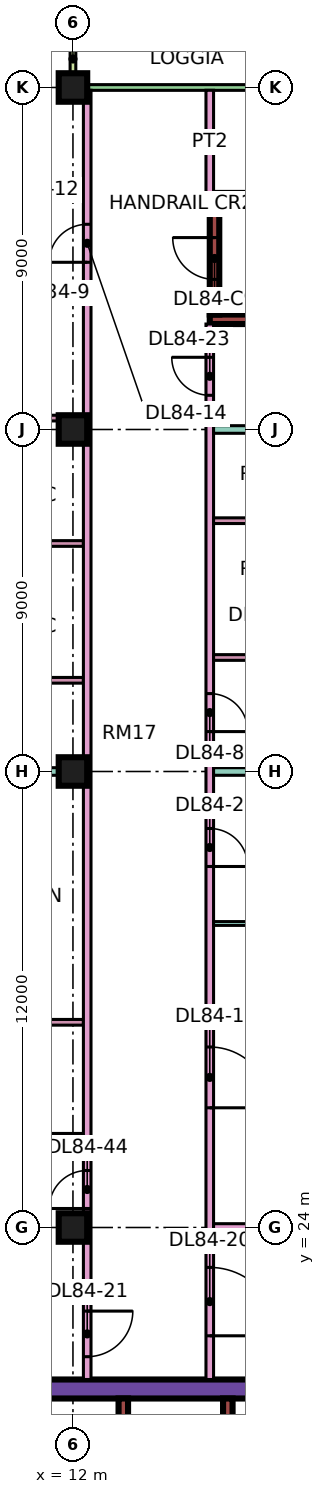
"""IFC4 building model, lengths in metres.
Left out: names, types, materials, properties, quantities, classifications, styles, units other than length and angle.
Written with IfcOpenShell. Run it as: python <this file> out.ifc"""

import sys

from ifc_helpers import new_model, si_unit, direction, frame, frame_2d, origin, origin_2d, place, context, subcontext, project, spatial, rectangle, extrude, element, fill, save


model = new_model("IFC4")
c1 = context("Model", 3, precision=1e-05, world=origin(), true_north=direction((0.0, 1.0)))
c2 = subcontext(c1, "Body", "Model", "MODEL_VIEW")
j1 = project(units=[si_unit("LENGTHUNIT", "METRE"), si_unit("PLANEANGLEUNIT", "RADIAN")], contexts=[c1])
p1 = place(None, origin())
s1 = spatial("IfcSite", under=j1, at=p1, CompositionType="ELEMENT")
p2 = place(p1, origin())
s2 = spatial("IfcBuilding", under=s1, at=p2, CompositionType="ELEMENT")
p3 = place(p2, frame((0.0, 0.0, 361.4)))
s3 = spatial("IfcBuildingStorey", under=s2, at=p3, CompositionType="ELEMENT", Elevation=361.4)
for number, where, z_axis, x_axis in (
    (1, (12.0, 24.0, 0.0), (0.0, 0.0, 1.0), (1.0, 0.0, 0.0)),
    (2, (12.0, 36.0, 0.0), (0.0, 0.0, 1.0), (1.0, 0.0, 0.0)),
    (3, (12.0, 45.0, 0.0), (0.0, 0.0, 1.0), (1.0, 0.0, 0.0)),
    (4, (12.0, 54.0, 0.0), (0.0, 0.0, 1.0), (1.0, 0.0, 0.0)),
):
    element("IfcColumn", number, at=place(p3, frame(where, z_axis=z_axis, x_axis=x_axis)), inside=s3, PredefinedType="COLUMN", context=c2, shape_type="SweptSolid", body=[
        extrude(rectangle(XDim=0.75, YDim=0.75, at=origin_2d()), origin(), (0.0, 0.0, 1.0), 3.75),
    ])
p4 = place(p3, frame((9.0, 19.75, 0.0), z_axis=(0.0, 0.0, 1.0), x_axis=(1.0, 0.0, 0.0)))
e5 = element("IfcWall", 5, at=p4, inside=s3, PredefinedType="SHEAR", context=c2, shape_type="SweptSolid", body=[
    extrude(rectangle(XDim=25.0, YDim=0.5, at=frame_2d((12.5, 0.0))), origin(), (0.0, 0.0, 1.0), 3.75),
])
p5 = place(p4, frame((19.1, 0.0, 0.0)))
e6 = element("IfcOpeningElement", 6, at=p5, cuts=e5, PredefinedType="OPENING", context=c2, shape_type="SweptSolid", body=[
    extrude(rectangle(XDim=1.8, YDim=2.4, at=frame_2d((0.9, 1.2))), frame((0.0, 0.26, 0.0), z_axis=(0.0, -1.0, 0.0), x_axis=(1.0, 0.0, 0.0)), (0.0, 0.0, 1.0), 0.52),
])
p6 = place(p3, frame((13.325, 7.5, 0.0), z_axis=(0.0, 0.0, 1.0), x_axis=(0.0, 1.0, 0.0)))
e7 = element("IfcWall", 7, at=p6, inside=s3, PredefinedType="SHEAR", context=c2, shape_type="SweptSolid", body=[
    extrude(rectangle(XDim=12.0, YDim=0.25, at=frame_2d((6.0, 0.0))), origin(), (0.0, 0.0, 1.0), 3.75),
])
p7 = place(p3, frame((16.075, 15.8, 0.0), z_axis=(0.0, 0.0, 1.0), x_axis=(0.0, 1.0, 0.0)))
e8 = element("IfcWall", 8, at=p7, inside=s3, PredefinedType="SHEAR", context=c2, shape_type="SweptSolid", body=[
    extrude(rectangle(XDim=3.7, YDim=0.25, at=frame_2d((1.85, 0.0))), origin(), (0.0, 0.0, 1.0), 3.75),
])
for number, where, z_axis, x_axis in (
    (9, (15.6, 47.9, 0.0), (0.0, 0.0, 1.0), (1.0, 0.0, 0.0)),
    (10, (15.6, 51.1, 0.0), (0.0, 0.0, 1.0), (1.0, 0.0, 0.0)),
):
    element("IfcWall", number, at=place(p3, frame(where, z_axis=z_axis, x_axis=x_axis)), inside=s3, PredefinedType="SHEAR", context=c2, shape_type="SweptSolid", body=[
        extrude(rectangle(XDim=7.0, YDim=0.25, at=frame_2d((3.5, 0.0))), origin(), (0.0, 0.0, 1.0), 3.75),
    ])
p8 = place(p3, frame((15.725, 48.025, 0.0), z_axis=(0.0, 0.0, 1.0), x_axis=(0.0, 1.0, 0.0)))
e11 = element("IfcWall", 11, at=p8, inside=s3, PredefinedType="SHEAR", context=c2, shape_type="SweptSolid", body=[
    extrude(rectangle(XDim=2.95, YDim=0.25, at=frame_2d((1.475, 0.0))), origin(), (0.0, 0.0, 1.0), 3.75),
])
p9 = place(p8, frame((0.925, 0.0, 0.0)))
e12 = element("IfcOpeningElement", 12, at=p9, cuts=e11, PredefinedType="OPENING", context=c2, shape_type="SweptSolid", body=[
    extrude(rectangle(XDim=1.1, YDim=2.2, at=frame_2d((0.55, 1.1))), frame((0.0, 0.135, 0.0), z_axis=(0.0, -1.0, 0.0), x_axis=(1.0, 0.0, 0.0)), (0.0, 0.0, 1.0), 0.27),
])
p10 = place(p3, frame((22.425, 54.0, 0.0), z_axis=(0.0, 0.0, 1.0), x_axis=(-1.0, 0.0, 0.0)))
e13 = element("IfcWall", 13, at=p10, inside=s3, PredefinedType="SOLIDWALL", context=c2, shape_type="SweptSolid", body=[
    extrude(rectangle(XDim=10.35, YDim=0.15, at=frame_2d((5.175, 0.0))), origin(), (0.0, 0.0, 1.0), 3.35),
])
p11 = place(p10, frame((1.012, 0.0, 0.45)))
e14 = element("IfcOpeningElement", 14, at=p11, cuts=e13, PredefinedType="OPENING", context=c2, shape_type="SweptSolid", body=[
    extrude(rectangle(XDim=4.8, YDim=2.4, at=frame_2d((2.4, 1.2))), frame((0.0, 0.085, 0.0), z_axis=(0.0, -1.0, 0.0), x_axis=(1.0, 0.0, 0.0)), (0.0, 0.0, 1.0), 0.17),
])
p12 = place(p3, frame((12.0, 55.5, 0.0), z_axis=(0.0, 0.0, 1.0), x_axis=(0.0, -1.0, 0.0)))
e15 = element("IfcWall", 15, at=p12, inside=s3, PredefinedType="SOLIDWALL", context=c2, shape_type="SweptSolid", body=[
    extrude(rectangle(XDim=1.5, YDim=0.15, at=frame_2d((0.75, 0.0))), origin(), (0.0, 0.0, 1.0), 3.35),
])
p13 = place(p3, frame((0.0, 36.0, 0.0), z_axis=(0.0, 0.0, 1.0), x_axis=(1.0, 0.0, 0.0)))
e16 = element("IfcWall", 16, at=p13, inside=s3, PredefinedType="PARTITIONING", context=c2, shape_type="SweptSolid", body=[
    extrude(rectangle(XDim=12.275, YDim=0.2, at=frame_2d((6.137, 0.0))), origin(), (0.0, 0.0, 1.0), 3.35),
])
p14 = place(p3, frame((0.074, 22.4, 0.0), z_axis=(0.0, 0.0, 1.0), x_axis=(1.0, 0.0, 0.0)))
e17 = element("IfcWall", 17, at=p14, inside=s3, PredefinedType="PARTITIONING", context=c2, shape_type="SweptSolid", body=[
    extrude(rectangle(XDim=12.201, YDim=0.2, at=frame_2d((6.101, 0.0))), origin(), (0.0, 0.0, 1.0), 3.35),
])
for number, where, z_axis, x_axis in (
    (18, (7.05, 26.4, 0.0), (0.0, 0.0, 1.0), (1.0, 0.0, 0.0)),
    (19, (7.05, 29.4, 0.0), (0.0, 0.0, 1.0), (1.0, 0.0, 0.0)),
):
    element("IfcWall", number, at=place(p3, frame(where, z_axis=z_axis, x_axis=x_axis)), inside=s3, PredefinedType="PARTITIONING", context=c2, shape_type="SweptSolid", body=[
        extrude(rectangle(XDim=5.225, YDim=0.15, at=frame_2d((2.612, 0.0))), origin(), (0.0, 0.0, 1.0), 3.35),
    ])
p15 = place(p3, frame((7.525, 51.3, 0.0), z_axis=(0.0, 0.0, 1.0), x_axis=(1.0, 0.0, 0.0)))
e20 = element("IfcWall", 20, at=p15, inside=s3, PredefinedType="PARTITIONING", context=c2, shape_type="SweptSolid", body=[
    extrude(rectangle(XDim=4.75, YDim=0.1, at=frame_2d((2.375, 0.0))), origin(), (0.0, 0.0, 1.0), 3.35),
])
p16 = place(p15, frame((2.0, 0.0, 0.0)))
e21 = element("IfcOpeningElement", 21, at=p16, cuts=e20, PredefinedType="OPENING", context=c2, shape_type="SweptSolid", body=[
    extrude(rectangle(XDim=0.9, YDim=2.1, at=frame_2d((0.45, 1.05))), frame((0.0, 0.06, 0.0), z_axis=(0.0, -1.0, 0.0), x_axis=(1.0, 0.0, 0.0)), (0.0, 0.0, 1.0), 0.12),
])
for number, where, z_axis, x_axis in (
    (22, (7.65, 38.4, 0.0), (0.0, 0.0, 1.0), (1.0, 0.0, 0.0)),
    (23, (7.65, 42.0, 0.0), (0.0, 0.0, 1.0), (1.0, 0.0, 0.0)),
    (24, (7.65, 45.3, 0.0), (0.0, 0.0, 1.0), (1.0, 0.0, 0.0)),
):
    element("IfcWall", number, at=place(p3, frame(where, z_axis=z_axis, x_axis=x_axis)), inside=s3, PredefinedType="PARTITIONING", context=c2, shape_type="SweptSolid", body=[
        extrude(rectangle(XDim=4.625, YDim=0.15, at=frame_2d((2.312, 0.0))), origin(), (0.0, 0.0, 1.0), 3.35),
    ])
p17 = place(p3, frame((7.65, 48.6, 0.0), z_axis=(0.0, 0.0, 1.0), x_axis=(1.0, 0.0, 0.0)))
e25 = element("IfcWall", 25, at=p17, inside=s3, PredefinedType="PARTITIONING", context=c2, shape_type="SweptSolid", body=[
    extrude(rectangle(XDim=4.625, YDim=0.15, at=frame_2d((2.312, 0.0))), origin(), (0.0, 0.0, 1.0), 3.35),
])
p18 = place(p17, frame((1.875, 0.0, 0.0)))
e26 = element("IfcOpeningElement", 26, at=p18, cuts=e25, PredefinedType="OPENING", context=c2, shape_type="SweptSolid", body=[
    extrude(rectangle(XDim=0.8, YDim=2.1, at=frame_2d((0.4, 1.05))), frame((0.0, 0.085, 0.0), z_axis=(0.0, -1.0, 0.0), x_axis=(1.0, 0.0, 0.0)), (0.0, 0.0, 1.0), 0.17),
])
p19 = place(p3, frame((12.375, 20.0, 0.0), z_axis=(0.0, 0.0, 1.0), x_axis=(0.0, 1.0, 0.0)))
e27 = element("IfcWall", 27, at=p19, inside=s3, PredefinedType="PARTITIONING", context=c2, shape_type="SweptSolid", body=[
    extrude(rectangle(XDim=33.926, YDim=0.2, at=frame_2d((16.963, 0.0))), origin(), (0.0, 0.0, 1.0), 3.35),
])
p20 = place(p19, frame((29.4, 0.0, 0.0)))
e28 = element("IfcOpeningElement", 28, at=p20, cuts=e27, PredefinedType="OPENING", context=c2, shape_type="SweptSolid", body=[
    extrude(rectangle(XDim=1.0, YDim=2.1, at=frame_2d((0.5, 1.05))), frame((0.0, 0.11, 0.0), z_axis=(0.0, -1.0, 0.0), x_axis=(1.0, 0.0, 0.0)), (0.0, 0.0, 1.0), 0.22),
])
p21 = place(p19, frame((0.6, 0.0, 0.0)))
e29 = element("IfcOpeningElement", 29, at=p21, cuts=e27, PredefinedType="OPENING", context=c2, shape_type="SweptSolid", body=[
    extrude(rectangle(XDim=1.2, YDim=2.1, at=frame_2d((0.6, 1.05))), frame((0.0, 0.11, 0.0), z_axis=(0.0, -1.0, 0.0), x_axis=(1.0, 0.0, 0.0)), (0.0, 0.0, 1.0), 0.22),
])
p22 = place(p19, frame((4.5, 0.0, 0.0)))
e30 = element("IfcOpeningElement", 30, at=p22, cuts=e27, PredefinedType="OPENING", context=c2, shape_type="SweptSolid", body=[
    extrude(rectangle(XDim=1.0, YDim=2.1, at=frame_2d((0.5, 1.05))), frame((0.0, 0.11, 0.0), z_axis=(0.0, -1.0, 0.0), x_axis=(1.0, 0.0, 0.0)), (0.0, 0.0, 1.0), 0.22),
])
p23 = place(p3, frame((15.6, 20.0, 0.0), z_axis=(0.0, 0.0, 1.0), x_axis=(0.0, 1.0, 0.0)))
e31 = element("IfcWall", 31, at=p23, inside=s3, PredefinedType="PARTITIONING", context=c2, shape_type="SweptSolid", body=[
    extrude(rectangle(XDim=27.775, YDim=0.2, at=frame_2d((13.887, 0.0))), origin(), (0.0, 0.0, 1.0), 3.35),
])
p24 = place(p23, frame((7.15, 0.0, 0.0)))
e32 = element("IfcOpeningElement", 32, at=p24, cuts=e31, PredefinedType="OPENING", context=c2, shape_type="SweptSolid", body=[
    extrude(rectangle(XDim=1.6, YDim=2.1, at=frame_2d((0.8, 1.05))), frame((0.0, 0.11, 0.0), z_axis=(0.0, -1.0, 0.0), x_axis=(1.0, 0.0, 0.0)), (0.0, 0.0, 1.0), 0.22),
])
p25 = place(p23, frame((13.5, 0.0, 0.0)))
e33 = element("IfcOpeningElement", 33, at=p25, cuts=e31, PredefinedType="OPENING", context=c2, shape_type="SweptSolid", body=[
    extrude(rectangle(XDim=1.0, YDim=2.1, at=frame_2d((0.5, 1.05))), frame((0.0, 0.11, 0.0), z_axis=(0.0, -1.0, 0.0), x_axis=(1.0, 0.0, 0.0)), (0.0, 0.0, 1.0), 0.22),
])
p26 = place(p23, frame((17.05, 0.0, 0.0)))
e34 = element("IfcOpeningElement", 34, at=p26, cuts=e31, PredefinedType="OPENING", context=c2, shape_type="SweptSolid", body=[
    extrude(rectangle(XDim=1.0, YDim=2.1, at=frame_2d((0.5, 1.05))), frame((0.0, 0.11, 0.0), z_axis=(0.0, -1.0, 0.0), x_axis=(1.0, 0.0, 0.0)), (0.0, 0.0, 1.0), 0.22),
])
p27 = place(p23, frame((1.15, 0.0, 0.0)))
e35 = element("IfcOpeningElement", 35, at=p27, cuts=e31, PredefinedType="OPENING", context=c2, shape_type="SweptSolid", body=[
    extrude(rectangle(XDim=1.8, YDim=2.1, at=frame_2d((0.9, 1.05))), frame((0.0, 0.11, 0.0), z_axis=(0.0, -1.0, 0.0), x_axis=(1.0, 0.0, 0.0)), (0.0, 0.0, 1.0), 0.22),
])
p28 = place(p23, frame((25.9, 0.0, 0.0)))
e36 = element("IfcOpeningElement", 36, at=p28, cuts=e31, PredefinedType="OPENING", context=c2, shape_type="SweptSolid", body=[
    extrude(rectangle(XDim=1.0, YDim=2.1, at=frame_2d((0.5, 1.05))), frame((0.0, 0.11, 0.0), z_axis=(0.0, -1.0, 0.0), x_axis=(1.0, 0.0, 0.0)), (0.0, 0.0, 1.0), 0.22),
])
p29 = place(p3, frame((15.6, 51.225, 0.0), z_axis=(0.0, 0.0, 1.0), x_axis=(0.0, 1.0, 0.0)))
e37 = element("IfcWall", 37, at=p29, inside=s3, PredefinedType="PARTITIONING", context=c2, shape_type="SweptSolid", body=[
    extrude(rectangle(XDim=2.701, YDim=0.2, at=frame_2d((1.351, 0.0))), origin(), (0.0, 0.0, 1.0), 3.35),
])
p30 = place(p3, frame((15.7, 24.0, 0.0), z_axis=(0.0, 0.0, 1.0), x_axis=(1.0, 0.0, 0.0)))
e38 = element("IfcWall", 38, at=p30, inside=s3, PredefinedType="PARTITIONING", context=c2, shape_type="SweptSolid", body=[
    extrude(rectangle(XDim=5.8, YDim=0.2, at=frame_2d((2.9, 0.0))), origin(), (0.0, 0.0, 1.0), 3.35),
])
p31 = place(p3, frame((15.7, 32.0, 0.0), z_axis=(0.0, 0.0, 1.0), x_axis=(1.0, 0.0, 0.0)))
e39 = element("IfcWall", 39, at=p31, inside=s3, PredefinedType="PARTITIONING", context=c2, shape_type="SweptSolid", body=[
    extrude(rectangle(XDim=5.8, YDim=0.1, at=frame_2d((2.9, 0.0))), origin(), (0.0, 0.0, 1.0), 3.35),
])
p32 = place(p3, frame((15.7, 36.0, 0.0), z_axis=(0.0, 0.0, 1.0), x_axis=(1.0, 0.0, 0.0)))
e40 = element("IfcWall", 40, at=p32, inside=s3, PredefinedType="PARTITIONING", context=c2, shape_type="SweptSolid", body=[
    extrude(rectangle(XDim=8.3, YDim=0.2, at=frame_2d((4.15, 0.0))), origin(), (0.0, 0.0, 1.0), 3.35),
])
p33 = place(p3, frame((15.7, 39.0, 0.0), z_axis=(0.0, 0.0, 1.0), x_axis=(1.0, 0.0, 0.0)))
e41 = element("IfcWall", 41, at=p33, inside=s3, PredefinedType="PARTITIONING", context=c2, shape_type="SweptSolid", body=[
    extrude(rectangle(XDim=2.525, YDim=0.15, at=frame_2d((1.263, 0.0))), origin(), (0.0, 0.0, 1.0), 3.35),
])
p34 = place(p33, frame((0.9, 0.0, 0.0)))
e42 = element("IfcOpeningElement", 42, at=p34, cuts=e41, PredefinedType="OPENING", context=c2, shape_type="SweptSolid", body=[
    extrude(rectangle(XDim=0.8, YDim=2.1, at=frame_2d((0.4, 1.05))), frame((0.0, 0.085, 0.0), z_axis=(0.0, -1.0, 0.0), x_axis=(1.0, 0.0, 0.0)), (0.0, 0.0, 1.0), 0.17),
])
p35 = place(p3, frame((15.7, 42.6, 0.0), z_axis=(0.0, 0.0, 1.0), x_axis=(1.0, 0.0, 0.0)))
e43 = element("IfcWall", 43, at=p35, inside=s3, PredefinedType="PARTITIONING", context=c2, shape_type="SweptSolid", body=[
    extrude(rectangle(XDim=2.525, YDim=0.15, at=frame_2d((1.263, 0.0))), origin(), (0.0, 0.0, 1.0), 3.35),
])
p36 = place(p3, frame((15.7, 45.0, 0.0), z_axis=(0.0, 0.0, 1.0), x_axis=(1.0, 0.0, 0.0)))
e44 = element("IfcWall", 44, at=p36, inside=s3, PredefinedType="PARTITIONING", context=c2, shape_type="SweptSolid", body=[
    extrude(rectangle(XDim=8.226, YDim=0.2, at=frame_2d((4.113, 0.0))), origin(), (0.0, 0.0, 1.0), 3.35),
])
p37 = place(p9, frame((1.1, 0.0, 0.0), z_axis=(0.0, 0.0, 1.0), x_axis=(-1.0, 0.0, 0.0)))
e45 = element("IfcDoor", 45, at=p37, inside=s3, OperationType="SINGLE_SWING_RIGHT", PredefinedType="DOOR", context=c2, shape_type="SweptSolid", body=[
    extrude(rectangle(XDim=1.1, YDim=2.2, at=frame_2d((0.55, 1.1))), frame((0.0, 0.025, 0.0), z_axis=(0.0, -1.0, 0.0), x_axis=(1.0, 0.0, 0.0)), (0.0, 0.0, 1.0), 0.05),
])
fill(e12, e45)
p38 = place(p24, frame((1.6, 0.0, 0.0), z_axis=(0.0, 0.0, 1.0), x_axis=(-1.0, 0.0, 0.0)))
e46 = element("IfcDoor", 46, at=p38, inside=s3, OperationType="DOUBLE_DOOR_SINGLE_SWING", PredefinedType="DOOR", context=c2, shape_type="SweptSolid", body=[
    extrude(rectangle(XDim=1.6, YDim=2.1, at=frame_2d((0.8, 1.05))), frame((0.0, 0.025, 0.0), z_axis=(0.0, -1.0, 0.0), x_axis=(1.0, 0.0, 0.0)), (0.0, 0.0, 1.0), 0.05),
])
fill(e32, e46)
p39 = place(p25, frame((1.0, 0.0, 0.0), z_axis=(0.0, 0.0, 1.0), x_axis=(-1.0, 0.0, 0.0)))
e47 = element("IfcDoor", 47, at=p39, inside=s3, OperationType="SINGLE_SWING_LEFT", PredefinedType="DOOR", context=c2, shape_type="SweptSolid", body=[
    extrude(rectangle(XDim=1.0, YDim=2.1, at=frame_2d((0.5, 1.05))), frame((0.0, 0.025, 0.0), z_axis=(0.0, -1.0, 0.0), x_axis=(1.0, 0.0, 0.0)), (0.0, 0.0, 1.0), 0.05),
])
fill(e33, e47)
p40 = place(p26, frame((1.0, 0.0, 0.0), z_axis=(0.0, 0.0, 1.0), x_axis=(-1.0, 0.0, 0.0)))
e48 = element("IfcDoor", 48, at=p40, inside=s3, OperationType="SINGLE_SWING_LEFT", PredefinedType="DOOR", context=c2, shape_type="SweptSolid", body=[
    extrude(rectangle(XDim=1.0, YDim=2.1, at=frame_2d((0.5, 1.05))), frame((0.0, 0.025, 0.0), z_axis=(0.0, -1.0, 0.0), x_axis=(1.0, 0.0, 0.0)), (0.0, 0.0, 1.0), 0.05),
])
fill(e34, e48)
p41 = place(p20, origin())
e49 = element("IfcDoor", 49, at=p41, inside=s3, OperationType="SINGLE_SWING_LEFT", PredefinedType="DOOR", context=c2, shape_type="SweptSolid", body=[
    extrude(rectangle(XDim=1.0, YDim=2.1, at=frame_2d((0.5, 1.05))), frame((0.0, 0.025, 0.0), z_axis=(0.0, -1.0, 0.0), x_axis=(1.0, 0.0, 0.0)), (0.0, 0.0, 1.0), 0.05),
])
fill(e28, e49)
p42 = place(p27, frame((1.8, 0.0, 0.0), z_axis=(0.0, 0.0, 1.0), x_axis=(-1.0, 0.0, 0.0)))
e50 = element("IfcDoor", 50, at=p42, inside=s3, OperationType="DOUBLE_DOOR_SINGLE_SWING", PredefinedType="DOOR", context=c2, shape_type="SweptSolid", body=[
    extrude(rectangle(XDim=1.8, YDim=2.1, at=frame_2d((0.9, 1.05))), frame((0.0, 0.025, 0.0), z_axis=(0.0, -1.0, 0.0), x_axis=(1.0, 0.0, 0.0)), (0.0, 0.0, 1.0), 0.05),
])
fill(e35, e50)
p43 = place(p21, origin())
e51 = element("IfcDoor", 51, at=p43, inside=s3, OperationType="SINGLE_SWING_RIGHT", PredefinedType="DOOR", context=c2, shape_type="SweptSolid", body=[
    extrude(rectangle(XDim=1.2, YDim=2.1, at=frame_2d((0.6, 1.05))), frame((0.0, 0.025, 0.0), z_axis=(0.0, -1.0, 0.0), x_axis=(1.0, 0.0, 0.0)), (0.0, 0.0, 1.0), 0.05),
])
fill(e29, e51)
p44 = place(p28, frame((1.0, 0.0, 0.0), z_axis=(0.0, 0.0, 1.0), x_axis=(-1.0, 0.0, 0.0)))
e52 = element("IfcDoor", 52, at=p44, inside=s3, OperationType="SINGLE_SWING_RIGHT", PredefinedType="DOOR", context=c2, shape_type="SweptSolid", body=[
    extrude(rectangle(XDim=1.0, YDim=2.1, at=frame_2d((0.5, 1.05))), frame((0.0, 0.025, 0.0), z_axis=(0.0, -1.0, 0.0), x_axis=(1.0, 0.0, 0.0)), (0.0, 0.0, 1.0), 0.05),
])
fill(e36, e52)
p45 = place(p22, origin())
e53 = element("IfcDoor", 53, at=p45, inside=s3, OperationType="SINGLE_SWING_LEFT", PredefinedType="DOOR", context=c2, shape_type="SweptSolid", body=[
    extrude(rectangle(XDim=1.0, YDim=2.1, at=frame_2d((0.5, 1.05))), frame((0.0, 0.025, 0.0), z_axis=(0.0, -1.0, 0.0), x_axis=(1.0, 0.0, 0.0)), (0.0, 0.0, 1.0), 0.05),
])
fill(e30, e53)
save(model, sys.argv[1])
